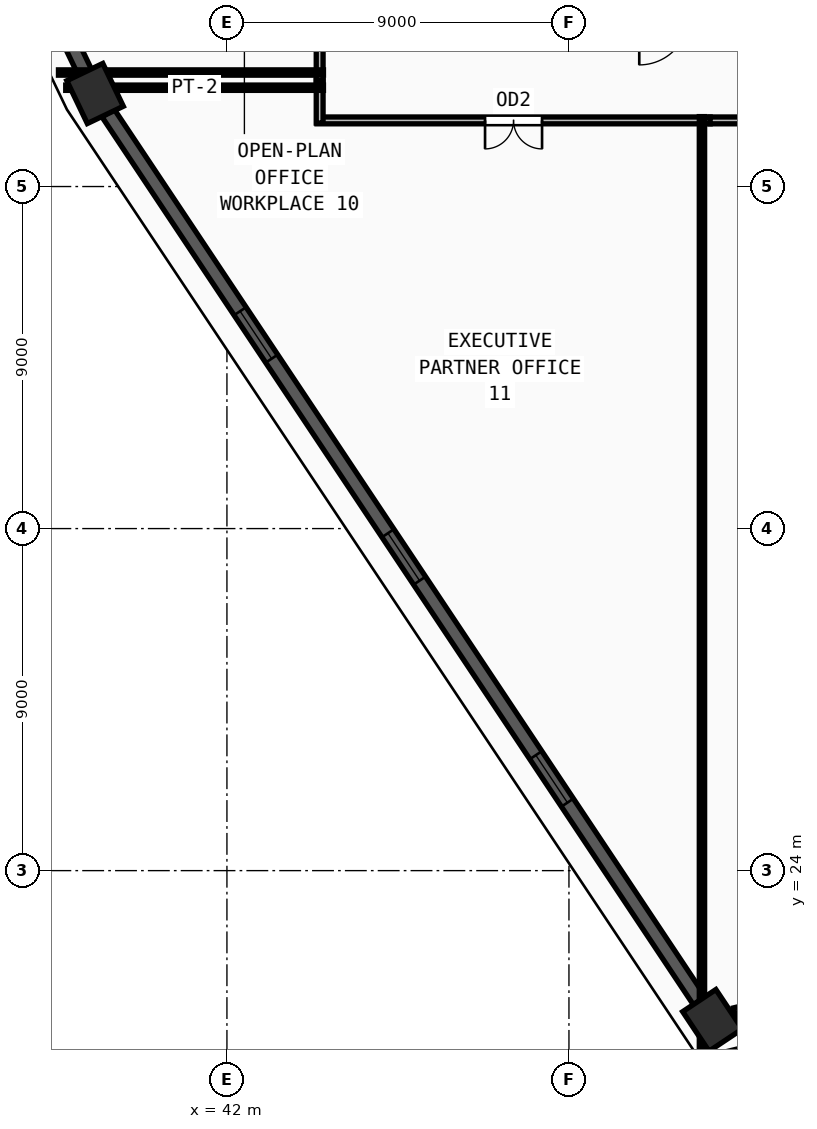
"""IFC4 building model, lengths in metres.
Left out: names, types, materials, properties, quantities, classifications, styles, units other than length and angle.
Written with IfcOpenShell. Run it as: python <this file> out.ifc"""

import sys

from ifc_helpers import new_model, si_unit, direction, frame, frame_2d, origin, origin_2d, place, context, subcontext, project, spatial, rectangle, extrude, source, transform, mapped, element, fill, save


model = new_model("IFC4")
c1 = context("Model", 3, precision=1e-05, world=origin(), true_north=direction((0.0, 1.0)))
c2 = subcontext(c1, "Body", "Model", "MODEL_VIEW")
j1 = project(units=[si_unit("LENGTHUNIT", "METRE"), si_unit("PLANEANGLEUNIT", "RADIAN")], contexts=[c1])
p1 = place(None, origin())
s1 = spatial("IfcSite", under=j1, at=p1, CompositionType="ELEMENT")
p2 = place(p1, origin())
s2 = spatial("IfcBuilding", under=s1, at=p2, CompositionType="ELEMENT")
p3 = place(p2, frame((0.0, 0.0, 247.5)))
s3 = spatial("IfcBuildingStorey", under=s2, at=p3, CompositionType="ELEMENT", Elevation=247.5)
m1 = source(origin(), c2, "Body", "SweptSolid", [
    extrude(rectangle(XDim=1.25, YDim=1.05, at=origin_2d()), origin(), (0.0, 0.0, 1.0), 3.75),
])
for number, where, z_axis, x_axis in (
    (1, (54.776, 20.06, 0.0), (0.0, 0.0, 1.0), (-0.554, 0.832, 0.0)),
    (2, (38.53, 44.448, 0.0), (0.0, 0.0, 1.0), (-0.432, 0.902, 0.0)),
):
    element("IfcColumn", number, at=place(p3, frame(where, z_axis=z_axis, x_axis=x_axis)), inside=s3, PredefinedType="COLUMN", context=c2, shape_type="MappedRepresentation", body=[
        mapped(m1, transform((0.0, 0.0, 0.0), x_axis=(1.0, 0.0, 0.0), y_axis=(0.0, 1.0, 0.0), z_axis=(0.0, 0.0, 1.0), scale=1.0)),
    ])
p4 = place(p3, frame((28.256, 65.886, 0.0), z_axis=(0.0, 0.0, 1.0), x_axis=(0.432167516052, -0.901793345545, 0.0)))
e3 = element("IfcWall", 3, at=p4, inside=s3, PredefinedType="SOLIDWALL", context=c2, shape_type="SweptSolid", body=[
    extrude(rectangle(XDim=23.157, YDim=0.38, at=frame_2d((11.579, 0.0))), origin(), (0.0, 0.0, 1.0), 3.57),
])
m2 = source(origin(), c2, "Body", "SweptSolid", [
    extrude(rectangle(XDim=1.5, YDim=1.9, at=frame_2d((0.75, 0.95))), frame((0.0, 0.2, 0.0), z_axis=(0.0, -1.0, 0.0), x_axis=(1.0, 0.0, 0.0)), (0.0, 0.0, 1.0), 0.4),
])
p5 = place(p4, frame((5.039, 0.0, 0.55)))
e4 = element("IfcOpeningElement", 4, at=p5, cuts=e3, PredefinedType="OPENING", context=c2, shape_type="MappedRepresentation", body=[
    mapped(m2, transform((0.0, 0.0, 0.0), x_axis=(1.0, 0.0, 0.0), y_axis=(0.0, 1.0, 0.0), z_axis=(0.0, 0.0, 1.0), scale=1.0)),
])
p6 = place(p4, frame((10.829, 0.0, 0.55)))
e5 = element("IfcOpeningElement", 5, at=p6, cuts=e3, PredefinedType="OPENING", context=c2, shape_type="MappedRepresentation", body=[
    mapped(m2, transform((0.0, 0.0, 0.0), x_axis=(1.0, 0.0, 0.0), y_axis=(0.0, 1.0, 0.0), z_axis=(0.0, 0.0, 1.0), scale=1.0)),
])
p7 = place(p4, frame((14.418, 0.0, 0.55)))
e6 = element("IfcOpeningElement", 6, at=p7, cuts=e3, PredefinedType="OPENING", context=c2, shape_type="MappedRepresentation", body=[
    mapped(m2, transform((0.0, 0.0, 0.0), x_axis=(1.0, 0.0, 0.0), y_axis=(0.0, 1.0, 0.0), z_axis=(0.0, 0.0, 1.0), scale=1.0)),
])
p8 = place(p3, frame((38.871, 43.936, 0.0), z_axis=(0.0, 0.0, 1.0), x_axis=(0.554403141281, -0.832248254391, 0.0)))
e7 = element("IfcWall", 7, at=p8, inside=s3, PredefinedType="SOLIDWALL", context=c2, shape_type="SweptSolid", body=[
    extrude(rectangle(XDim=28.073, YDim=0.38, at=frame_2d((14.037, 0.0))), origin(), (0.0, 0.0, 1.0), 3.57),
])
p9 = place(p8, frame((6.268, 0.0, 0.55)))
e8 = element("IfcOpeningElement", 8, at=p9, cuts=e7, PredefinedType="OPENING", context=c2, shape_type="MappedRepresentation", body=[
    mapped(m2, transform((0.0, 0.0, 0.0), x_axis=(1.0, 0.0, 0.0), y_axis=(0.0, 1.0, 0.0), z_axis=(0.0, 0.0, 1.0), scale=1.0)),
])
p10 = place(p8, frame((13.287, 0.0, 0.55)))
e9 = element("IfcOpeningElement", 9, at=p10, cuts=e7, PredefinedType="OPENING", context=c2, shape_type="MappedRepresentation", body=[
    mapped(m2, transform((0.0, 0.0, 0.0), x_axis=(1.0, 0.0, 0.0), y_axis=(0.0, 1.0, 0.0), z_axis=(0.0, 0.0, 1.0), scale=1.0)),
])
p11 = place(p8, frame((20.305, 0.0, 0.55)))
e10 = element("IfcOpeningElement", 10, at=p11, cuts=e7, PredefinedType="OPENING", context=c2, shape_type="MappedRepresentation", body=[
    mapped(m2, transform((0.0, 0.0, 0.0), x_axis=(1.0, 0.0, 0.0), y_axis=(0.0, 1.0, 0.0), z_axis=(0.0, 0.0, 1.0), scale=1.0)),
])
p12 = place(p3, frame((55.374, 20.204, 0.0), z_axis=(0.0, 0.0, 1.0), x_axis=(0.972048835294, 0.234778750751, 0.0)))
e11 = element("IfcWall", 11, at=p12, inside=s3, PredefinedType="SOLIDWALL", context=c2, shape_type="SweptSolid", body=[
    extrude(rectangle(XDim=4.144, YDim=0.38, at=frame_2d((2.072, 0.0))), origin(), (0.0, 0.0, 1.0), 3.57),
])
m3 = source(origin(), c2, "Body", "SweptSolid", [
    extrude(rectangle(XDim=1.2, YDim=1.9, at=frame_2d((0.6, 0.95))), frame((0.0, 0.2, 0.0), z_axis=(0.0, -1.0, 0.0), x_axis=(1.0, 0.0, 0.0)), (0.0, 0.0, 1.0), 0.4),
])
p13 = place(p12, frame((1.472, 0.0, 0.55)))
e12 = element("IfcOpeningElement", 12, at=p13, cuts=e11, PredefinedType="OPENING", context=c2, shape_type="MappedRepresentation", body=[
    mapped(m3, transform((0.0, 0.0, 0.0), x_axis=(1.0, 0.0, 0.0), y_axis=(0.0, 1.0, 0.0), z_axis=(0.0, 0.0, 1.0), scale=1.0)),
])
p14 = place(p3, frame((54.715, 43.74, 0.0), z_axis=(0.0, 0.0, 1.0), x_axis=(-1.0, 0.0, 0.0)))
e13 = element("IfcWall", 13, at=p14, inside=s3, PredefinedType="PARTITIONING", context=c2, shape_type="SweptSolid", body=[
    extrude(rectangle(XDim=10.345, YDim=0.18, at=frame_2d((5.172, 0.0))), origin(), (0.0, 0.0, 1.0), 3.57),
])
m4 = source(origin(), c2, "Body", "SweptSolid", [
    extrude(rectangle(XDim=1.5, YDim=2.2, at=frame_2d((0.75, 1.1))), frame((0.0, 0.1, 0.0), z_axis=(0.0, -1.0, 0.0), x_axis=(1.0, 0.0, 0.0)), (0.0, 0.0, 1.0), 0.2),
])
p15 = place(p14, frame((4.423, 0.0, 0.0)))
e14 = element("IfcOpeningElement", 14, at=p15, cuts=e13, PredefinedType="OPENING", context=c2, shape_type="MappedRepresentation", body=[
    mapped(m4, transform((0.0, 0.0, 0.0), x_axis=(1.0, 0.0, 0.0), y_axis=(0.0, 1.0, 0.0), z_axis=(0.0, 0.0, 1.0), scale=1.0)),
])
p16 = place(p3, frame((75.63, 43.74, 0.0), z_axis=(0.0, 0.0, 1.0), x_axis=(-1.0, 0.0, 0.0)))
e15 = element("IfcWall", 15, at=p16, inside=s3, PredefinedType="PARTITIONING", context=c2, shape_type="SweptSolid", body=[
    extrude(rectangle(XDim=20.915, YDim=0.18, at=frame_2d((10.458, 0.0))), origin(), (0.0, 0.0, 1.0), 3.57),
])
p17 = place(p16, frame((9.707, 0.0, 0.0)))
e16 = element("IfcOpeningElement", 16, at=p17, cuts=e15, PredefinedType="OPENING", context=c2, shape_type="MappedRepresentation", body=[
    mapped(m4, transform((0.0, 0.0, 0.0), x_axis=(1.0, 0.0, 0.0), y_axis=(0.0, 1.0, 0.0), z_axis=(0.0, 0.0, 1.0), scale=1.0)),
])
p18 = place(p3, frame((44.44, 44.785, 0.0), z_axis=(0.0, 0.0, 1.0), x_axis=(0.0, 1.0, 0.0)))
e17 = element("IfcWall", 17, at=p18, inside=s3, PredefinedType="PARTITIONING", context=c2, shape_type="SweptSolid", body=[
    extrude(rectangle(XDim=3.425, YDim=0.18, at=frame_2d((1.712, 0.0))), origin(), (0.0, 0.0, 1.0), 3.57),
])
p19 = place(p3, frame((44.44, 43.67, 0.0), z_axis=(0.0, 0.0, 1.0), x_axis=(0.0, 1.0, 0.0)))
e18 = element("IfcWall", 18, at=p19, inside=s3, PredefinedType="PARTITIONING", context=c2, shape_type="SweptSolid", body=[
    extrude(rectangle(XDim=1.115, YDim=0.18, at=frame_2d((0.558, 0.0))), origin(), (0.0, 0.0, 1.0), 3.57),
])
p20 = place(p3, frame((44.54, 44.6, 0.0), z_axis=(0.0, 0.0, 1.0), x_axis=(-1.0, 0.0, 0.0)))
e19 = element("IfcWall", 19, at=p20, inside=s3, PredefinedType="PARTITIONING", context=c2, shape_type="SweptSolid", body=[
    extrude(rectangle(XDim=6.782, YDim=0.14, at=frame_2d((3.391, 0.0))), origin(), (0.0, 0.0, 1.0), 3.57),
])
p21 = place(p3, frame((44.54, 45.0, 0.0), z_axis=(0.0, 0.0, 1.0), x_axis=(-1.0, 0.0, 0.0)))
e20 = element("IfcWall", 20, at=p21, inside=s3, PredefinedType="PARTITIONING", context=c2, shape_type="SweptSolid", body=[
    extrude(rectangle(XDim=6.973, YDim=0.14, at=frame_2d((3.487, 0.0))), origin(), (0.0, 0.0, 1.0), 3.57),
])
p22 = place(p3, frame((54.5, 43.84, 0.0), z_axis=(0.0, 0.0, 1.0), x_axis=(0.0, -1.0, 0.0)))
e21 = element("IfcWall", 21, at=p22, inside=s3, PredefinedType="PARTITIONING", context=c2, shape_type="SweptSolid", body=[
    extrude(rectangle(XDim=24.495, YDim=0.14, at=frame_2d((12.248, 0.0))), origin(), (0.0, 0.0, 1.0), 2.855),
])
m5 = source(origin(), c2, "Body", "SweptSolid", [
    extrude(rectangle(XDim=1.5, YDim=1.9, at=frame_2d((0.75, 0.95))), frame((0.0, 0.03, 0.0), z_axis=(0.0, -1.0, 0.0), x_axis=(1.0, 0.0, 0.0)), (0.0, 0.0, 1.0), 0.06),
])
p23 = place(p9, origin())
e22 = element("IfcWindow", 22, at=p23, inside=s3, PartitioningType="DOUBLE_PANEL_VERTICAL", PredefinedType="WINDOW", context=c2, shape_type="MappedRepresentation", body=[
    mapped(m5, transform((0.0, 0.0, 0.0), x_axis=(1.0, 0.0, 0.0), y_axis=(0.0, 1.0, 0.0), z_axis=(0.0, 0.0, 1.0), scale=1.0)),
])
fill(e8, e22)
p24 = place(p10, origin())
e23 = element("IfcWindow", 23, at=p24, inside=s3, PartitioningType="DOUBLE_PANEL_VERTICAL", PredefinedType="WINDOW", context=c2, shape_type="MappedRepresentation", body=[
    mapped(m5, transform((0.0, 0.0, 0.0), x_axis=(1.0, 0.0, 0.0), y_axis=(0.0, 1.0, 0.0), z_axis=(0.0, 0.0, 1.0), scale=1.0)),
])
fill(e9, e23)
p25 = place(p11, origin())
e24 = element("IfcWindow", 24, at=p25, inside=s3, PartitioningType="DOUBLE_PANEL_VERTICAL", PredefinedType="WINDOW", context=c2, shape_type="MappedRepresentation", body=[
    mapped(m5, transform((0.0, 0.0, 0.0), x_axis=(1.0, 0.0, 0.0), y_axis=(0.0, 1.0, 0.0), z_axis=(0.0, 0.0, 1.0), scale=1.0)),
])
fill(e10, e24)
m6 = source(origin(), c2, "Body", "SweptSolid", [
    extrude(rectangle(XDim=1.5, YDim=2.2, at=frame_2d((0.75, 1.1))), frame((0.0, 0.025, 0.0), z_axis=(0.0, -1.0, 0.0), x_axis=(1.0, 0.0, 0.0)), (0.0, 0.0, 1.0), 0.05),
])
p26 = place(p15, origin())
e25 = element("IfcDoor", 25, at=p26, inside=s3, OperationType="DOUBLE_DOOR_SINGLE_SWING", PredefinedType="DOOR", context=c2, shape_type="MappedRepresentation", body=[
    mapped(m6, transform((0.0, 0.0, 0.0), x_axis=(1.0, 0.0, 0.0), y_axis=(0.0, 1.0, 0.0), z_axis=(0.0, 0.0, 1.0), scale=1.0)),
])
fill(e14, e25)
save(model, sys.argv[1])
